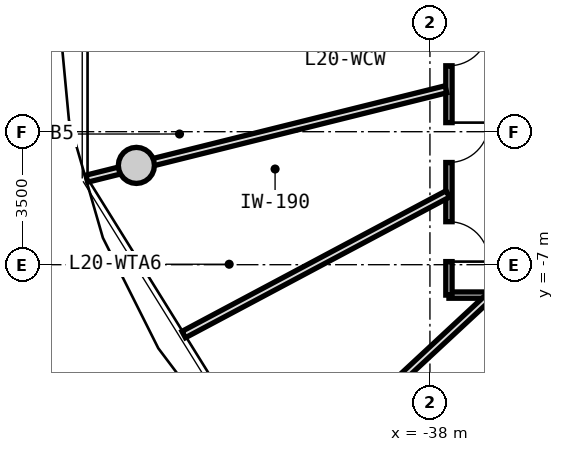
"""IFC4 building model, lengths in metres.
Left out: names, types, materials, properties, quantities, classifications, styles, units other than length and angle.
Written with IfcOpenShell. Run it as: python <this file> out.ifc"""

import sys

from ifc_helpers import new_model, si_unit, direction, frame, frame_2d, origin, origin_2d, place, context, subcontext, project, spatial, rectangle, circle, extrude, source, transform, mapped, element, fill, save


model = new_model("IFC4")
c1 = context("Model", 3, precision=1e-05, world=origin(), true_north=direction((0.0, 1.0)))
c2 = subcontext(c1, "Body", "Model", "MODEL_VIEW")
j1 = project(units=[si_unit("LENGTHUNIT", "METRE"), si_unit("PLANEANGLEUNIT", "RADIAN")], contexts=[c1])
p1 = place(None, origin())
s1 = spatial("IfcSite", under=j1, at=p1, CompositionType="ELEMENT")
p2 = place(p1, origin())
s2 = spatial("IfcBuilding", under=s1, at=p2, CompositionType="ELEMENT")
p3 = place(p2, frame((0.0, 0.0, 67.35)))
s3 = spatial("IfcBuildingStorey", under=s2, at=p3, CompositionType="ELEMENT", Elevation=67.35)
m1 = source(origin(), c2, "Body", "SweptSolid", [
    extrude(circle(Radius=0.475, at=origin_2d()), origin(), (0.0, 0.0, 1.0), 3.05),
])
p4 = place(p3, frame((-45.725, -4.387, 0.0), z_axis=(0.0, 0.0, 1.0), x_axis=(1.0, 0.0, 0.0)))
e1 = element("IfcColumn", 1, at=p4, inside=s3, PredefinedType="COLUMN", context=c2, shape_type="MappedRepresentation", body=[
    mapped(m1, transform((0.0, 0.0, 0.0), x_axis=(1.0, 0.0, 0.0), y_axis=(0.0, 1.0, 0.0), z_axis=(0.0, 0.0, 1.0), scale=1.0)),
])
m2 = source(origin(), c2, "Body", "SweptSolid", [
    extrude(rectangle(XDim=19.0, YDim=0.165, at=frame_2d((9.5, 0.0))), origin(), (0.0, 0.0, 1.0), 2.775),
])
p5 = place(p3, frame((-18.5, -7.8, 0.0), z_axis=(0.0, 0.0, 1.0), x_axis=(-1.0, 0.0, 0.0)))
e2 = element("IfcWall", 2, at=p5, inside=s3, PredefinedType="PARTITIONING", context=c2, shape_type="MappedRepresentation", body=[
    mapped(m2, transform((0.0, 0.0, 0.0), x_axis=(1.0, 0.0, 0.0), y_axis=(0.0, 1.0, 0.0), z_axis=(0.0, 0.0, 1.0), scale=1.0)),
])
p6 = place(p5, frame((14.244, 0.0, 0.0)))
e3 = element("IfcOpeningElement", 3, at=p6, cuts=e2, PredefinedType="OPENING", context=c2, shape_type="SweptSolid", body=[
    extrude(rectangle(XDim=1.25, YDim=2.2, at=frame_2d((0.625, 1.1))), frame((0.0, 0.093, 0.0), z_axis=(0.0, -1.0, 0.0), x_axis=(1.0, 0.0, 0.0)), (0.0, 0.0, 1.0), 0.185),
])
p7 = place(p5, frame((10.523, 0.0, 0.0)))
e4 = element("IfcOpeningElement", 4, at=p7, cuts=e2, PredefinedType="OPENING", context=c2, shape_type="SweptSolid", body=[
    extrude(rectangle(XDim=0.92, YDim=2.1, at=frame_2d((0.46, 1.05))), frame((0.0, 0.093, 0.0), z_axis=(0.0, -1.0, 0.0), x_axis=(1.0, 0.0, 0.0)), (0.0, 0.0, 1.0), 0.185),
])
p8 = place(p5, frame((8.226, 0.0, 0.0)))
e5 = element("IfcOpeningElement", 5, at=p8, cuts=e2, PredefinedType="OPENING", context=c2, shape_type="SweptSolid", body=[
    extrude(rectangle(XDim=0.92, YDim=2.1, at=frame_2d((0.46, 1.05))), frame((0.0, 0.093, 0.0), z_axis=(0.0, -1.0, 0.0), x_axis=(1.0, 0.0, 0.0)), (0.0, 0.0, 1.0), 0.185),
])
p9 = place(p5, frame((3.506, 0.0, 0.0)))
e6 = element("IfcOpeningElement", 6, at=p9, cuts=e2, PredefinedType="OPENING", context=c2, shape_type="SweptSolid", body=[
    extrude(rectangle(XDim=1.25, YDim=2.2, at=frame_2d((0.625, 1.1))), frame((0.0, 0.093, 0.0), z_axis=(0.0, -1.0, 0.0), x_axis=(1.0, 0.0, 0.0)), (0.0, 0.0, 1.0), 0.185),
])
m3 = source(origin(), c2, "Body", "SweptSolid", [
    extrude(rectangle(XDim=15.6, YDim=0.165, at=frame_2d((7.8, 0.0))), origin(), (0.0, 0.0, 1.0), 2.775),
])
p10 = place(p3, frame((-37.5, -7.8, 0.0), z_axis=(0.0, 0.0, 1.0), x_axis=(0.0, 1.0, 0.0)))
e7 = element("IfcWall", 7, at=p10, inside=s3, PredefinedType="PARTITIONING", context=c2, shape_type="MappedRepresentation", body=[
    mapped(m3, transform((0.0, 0.0, 0.0), x_axis=(1.0, 0.0, 0.0), y_axis=(0.0, 1.0, 0.0), z_axis=(0.0, 0.0, 1.0), scale=1.0)),
])
p11 = place(p10, frame((3.489, 0.0, 0.0)))
e8 = element("IfcOpeningElement", 8, at=p11, cuts=e7, PredefinedType="OPENING", context=c2, shape_type="SweptSolid", body=[
    extrude(rectangle(XDim=1.05, YDim=2.15, at=frame_2d((0.525, 1.075))), frame((0.0, 0.093, 0.0), z_axis=(0.0, -1.0, 0.0), x_axis=(1.0, 0.0, 0.0)), (0.0, 0.0, 1.0), 0.185),
])
p12 = place(p10, frame((0.882, 0.0, 0.0)))
e9 = element("IfcOpeningElement", 9, at=p12, cuts=e7, PredefinedType="OPENING", context=c2, shape_type="SweptSolid", body=[
    extrude(rectangle(XDim=1.05, YDim=2.15, at=frame_2d((0.525, 1.075))), frame((0.0, 0.093, 0.0), z_axis=(0.0, -1.0, 0.0), x_axis=(1.0, 0.0, 0.0)), (0.0, 0.0, 1.0), 0.185),
])
p13 = place(p10, frame((13.293, 0.0, 0.0)))
e10 = element("IfcOpeningElement", 10, at=p13, cuts=e7, PredefinedType="OPENING", context=c2, shape_type="SweptSolid", body=[
    extrude(rectangle(XDim=1.05, YDim=2.15, at=frame_2d((0.525, 1.075))), frame((0.0, 0.093, 0.0), z_axis=(0.0, -1.0, 0.0), x_axis=(1.0, 0.0, 0.0)), (0.0, 0.0, 1.0), 0.185),
])
p14 = place(p10, frame((11.018, 0.0, 0.0)))
e11 = element("IfcOpeningElement", 11, at=p14, cuts=e7, PredefinedType="OPENING", context=c2, shape_type="SweptSolid", body=[
    extrude(rectangle(XDim=1.05, YDim=2.15, at=frame_2d((0.525, 1.075))), frame((0.0, 0.093, 0.0), z_axis=(0.0, -1.0, 0.0), x_axis=(1.0, 0.0, 0.0)), (0.0, 0.0, 1.0), 0.185),
])
p15 = place(p10, frame((8.467, 0.0, 0.0)))
e12 = element("IfcOpeningElement", 12, at=p15, cuts=e7, PredefinedType="OPENING", context=c2, shape_type="SweptSolid", body=[
    extrude(rectangle(XDim=1.05, YDim=2.15, at=frame_2d((0.525, 1.075))), frame((0.0, 0.093, 0.0), z_axis=(0.0, -1.0, 0.0), x_axis=(1.0, 0.0, 0.0)), (0.0, 0.0, 1.0), 0.185),
])
p16 = place(p10, frame((6.035, 0.0, 0.0)))
e13 = element("IfcOpeningElement", 13, at=p16, cuts=e7, PredefinedType="OPENING", context=c2, shape_type="SweptSolid", body=[
    extrude(rectangle(XDim=1.05, YDim=2.15, at=frame_2d((0.525, 1.075))), frame((0.0, 0.093, 0.0), z_axis=(0.0, -1.0, 0.0), x_axis=(1.0, 0.0, 0.0)), (0.0, 0.0, 1.0), 0.185),
])
m4 = source(origin(), c2, "Body", "SweptSolid", [
    extrude(rectangle(XDim=9.737, YDim=0.19, at=frame_2d((4.869, 0.0))), origin(), (0.0, 0.0, 1.0), 2.225),
])
p17 = place(p3, frame((-37.58, -2.385, 0.0), z_axis=(0.0, 0.0, 1.0), x_axis=(-0.970392716238, -0.241532557375, 0.0)))
e14 = element("IfcWall", 14, at=p17, inside=s3, PredefinedType="PARTITIONING", context=c2, shape_type="MappedRepresentation", body=[
    mapped(m4, transform((0.0, 0.0, 0.0), x_axis=(1.0, 0.0, 0.0), y_axis=(0.0, 1.0, 0.0), z_axis=(0.0, 0.0, 1.0), scale=1.0)),
])
m5 = source(origin(), c2, "Body", "SweptSolid", [
    extrude(rectangle(XDim=7.435, YDim=0.19, at=frame_2d((3.717, 0.0))), origin(), (0.0, 0.0, 1.0), 2.225),
])
p18 = place(p3, frame((-36.483, -7.88, 0.0), z_axis=(0.0, 0.0, 1.0), x_axis=(-0.732651956848, -0.680603489652, 0.0)))
e15 = element("IfcWall", 15, at=p18, inside=s3, PredefinedType="PARTITIONING", context=c2, shape_type="MappedRepresentation", body=[
    mapped(m5, transform((0.0, 0.0, 0.0), x_axis=(1.0, 0.0, 0.0), y_axis=(0.0, 1.0, 0.0), z_axis=(0.0, 0.0, 1.0), scale=1.0)),
])
m6 = source(origin(), c2, "Body", "SweptSolid", [
    extrude(rectangle(XDim=7.873, YDim=0.19, at=frame_2d((3.937, 0.0))), origin(), (0.0, 0.0, 1.0), 2.775),
])
p19 = place(p3, frame((-37.53, -5.138, 0.0), z_axis=(0.0, 0.0, 1.0), x_axis=(-0.882666052726, -0.470000680175, 0.0)))
e16 = element("IfcWall", 16, at=p19, inside=s3, PredefinedType="PARTITIONING", context=c2, shape_type="MappedRepresentation", body=[
    mapped(m6, transform((0.0, 0.0, 0.0), x_axis=(1.0, 0.0, 0.0), y_axis=(0.0, 1.0, 0.0), z_axis=(0.0, 0.0, 1.0), scale=1.0)),
])
m7 = source(origin(), c2, "Body", "SweptSolid", [
    extrude(rectangle(XDim=1.05, YDim=2.15, at=frame_2d((0.525, 1.075))), frame((0.0, 0.025, 0.0), z_axis=(0.0, -1.0, 0.0), x_axis=(1.0, 0.0, 0.0)), (0.0, 0.0, 1.0), 0.05),
])
p20 = place(p11, frame((1.05, 0.0, 0.0), z_axis=(0.0, 0.0, 1.0), x_axis=(-1.0, 0.0, 0.0)))
e17 = element("IfcDoor", 17, at=p20, inside=s3, OperationType="SINGLE_SWING_LEFT", PredefinedType="DOOR", context=c2, shape_type="MappedRepresentation", body=[
    mapped(m7, transform((0.0, 0.0, 0.0), x_axis=(1.0, 0.0, 0.0), y_axis=(0.0, 1.0, 0.0), z_axis=(0.0, 0.0, 1.0), scale=1.0)),
])
fill(e8, e17)
p21 = place(p12, frame((1.05, 0.0, 0.0), z_axis=(0.0, 0.0, 1.0), x_axis=(-1.0, 0.0, 0.0)))
e18 = element("IfcDoor", 18, at=p21, inside=s3, OperationType="SINGLE_SWING_RIGHT", PredefinedType="DOOR", context=c2, shape_type="MappedRepresentation", body=[
    mapped(m7, transform((0.0, 0.0, 0.0), x_axis=(1.0, 0.0, 0.0), y_axis=(0.0, 1.0, 0.0), z_axis=(0.0, 0.0, 1.0), scale=1.0)),
])
fill(e9, e18)
p22 = place(p16, frame((1.05, 0.0, 0.0), z_axis=(0.0, 0.0, 1.0), x_axis=(-1.0, 0.0, 0.0)))
e19 = element("IfcDoor", 19, at=p22, inside=s3, OperationType="SINGLE_SWING_LEFT", PredefinedType="DOOR", context=c2, shape_type="MappedRepresentation", body=[
    mapped(m7, transform((0.0, 0.0, 0.0), x_axis=(1.0, 0.0, 0.0), y_axis=(0.0, 1.0, 0.0), z_axis=(0.0, 0.0, 1.0), scale=1.0)),
])
fill(e13, e19)
save(model, sys.argv[1])
